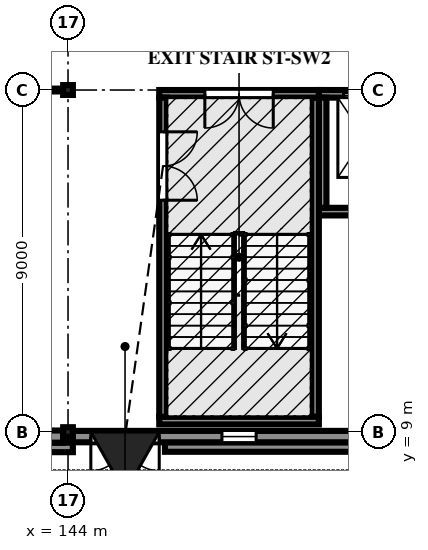
"""IFC4 building model, lengths in metres.
Left out: names, types, materials, properties, quantities, classifications, styles, units other than length and angle.
Written with IfcOpenShell. Run it as: python <this file> out.ifc"""

import sys

from ifc_helpers import new_model, si_unit, direction, frame, frame_2d, origin, origin_2d, place, context, subcontext, project, spatial, polyline, rectangle, i_section, outline, extrude, element, fill, save


model = new_model("IFC4")
c1 = context("Model", 3, precision=1e-05, world=origin(), true_north=direction((0.0, 1.0)))
c2 = subcontext(c1, "Body", "Model", "MODEL_VIEW")
j1 = project(units=[si_unit("LENGTHUNIT", "METRE"), si_unit("PLANEANGLEUNIT", "RADIAN")], contexts=[c1])
p1 = place(None, origin())
s1 = spatial("IfcSite", under=j1, at=p1, CompositionType="ELEMENT")
p2 = place(p1, origin())
s2 = spatial("IfcBuilding", under=s1, at=p2, CompositionType="ELEMENT")
p3 = place(p2, origin())
s3 = spatial("IfcBuildingStorey", under=s2, at=p3, CompositionType="ELEMENT", Elevation=0.0)
p4 = place(p3, frame((144.0, 9.0, -2.1), z_axis=(0.0, 0.0, 1.0), x_axis=(1.0, 0.0, 0.0)))
e1 = element("IfcColumn", 1, at=p4, inside=s3, PredefinedType="COLUMN", context=c2, shape_type="SweptSolid", body=[
    extrude(i_section(OverallWidth=0.255, OverallDepth=0.254, WebThickness=0.009, FlangeThickness=0.014, FilletRadius=0.013, at=origin_2d()), origin(), (0.0, 0.0, 1.0), 9.6),
])
p5 = place(p3, frame((144.0, 18.0, -2.1), z_axis=(0.0, 0.0, 1.0), x_axis=(1.0, 0.0, 0.0)))
e2 = element("IfcColumn", 2, at=p5, inside=s3, PredefinedType="COLUMN", context=c2, shape_type="SweptSolid", body=[
    extrude(i_section(OverallWidth=0.256, OverallDepth=0.26, WebThickness=0.01, FlangeThickness=0.017, FilletRadius=0.013, at=origin_2d()), origin(), (0.0, 0.0, 1.0), 9.6),
])
p6 = place(p3, frame((135.127, 8.88, 0.0), z_axis=(0.0, 0.0, 1.0), x_axis=(1.0, 0.0, 0.0)))
e3 = element("IfcWall", 3, at=p6, inside=s3, PredefinedType="SOLIDWALL", context=c2, shape_type="SweptSolid", body=[
    extrude(rectangle(XDim=8.746, YDim=0.32, at=frame_2d((4.373, 0.0))), origin(), (0.0, 0.0, 1.0), 6.767),
])
p7 = place(p6, frame((3.473, 0.0, 0.0)))
e4 = element("IfcOpeningElement", 4, at=p7, cuts=e3, PredefinedType="OPENING", context=c2, shape_type="SweptSolid", body=[
    extrude(rectangle(XDim=1.8, YDim=2.1, at=frame_2d((0.9, 1.05))), frame((0.0, 0.17, 0.0), z_axis=(0.0, -1.0, 0.0), x_axis=(1.0, 0.0, 0.0)), (0.0, 0.0, 1.0), 0.34),
])
p8 = place(p6, frame((3.773, 0.0, 2.55)))
e5 = element("IfcOpeningElement", 5, at=p8, cuts=e3, PredefinedType="OPENING", context=c2, shape_type="SweptSolid", body=[
    extrude(rectangle(XDim=1.2, YDim=0.6, at=frame_2d((0.6, 0.3))), frame((0.0, 0.17, 0.0), z_axis=(0.0, -1.0, 0.0), x_axis=(1.0, 0.0, 0.0)), (0.0, 0.0, 1.0), 0.34),
])
p9 = place(p6, frame((0.473, 0.0, 0.9)))
e6 = element("IfcOpeningElement", 6, at=p9, cuts=e3, PredefinedType="OPENING", context=c2, shape_type="SweptSolid", body=[
    extrude(rectangle(XDim=1.8, YDim=3.6, at=frame_2d((0.9, 1.8))), frame((0.0, 0.17, 0.0), z_axis=(0.0, -1.0, 0.0), x_axis=(1.0, 0.0, 0.0)), (0.0, 0.0, 1.0), 0.34),
])
p10 = place(p6, frame((6.473, 0.0, 0.9)))
e7 = element("IfcOpeningElement", 7, at=p10, cuts=e3, PredefinedType="OPENING", context=c2, shape_type="SweptSolid", body=[
    extrude(rectangle(XDim=1.8, YDim=3.6, at=frame_2d((0.9, 1.8))), frame((0.0, 0.17, 0.0), z_axis=(0.0, -1.0, 0.0), x_axis=(1.0, 0.0, 0.0)), (0.0, 0.0, 1.0), 0.34),
])
p11 = place(p3, frame((144.127, 8.88, 0.0), z_axis=(0.0, 0.0, 1.0), x_axis=(1.0, 0.0, 0.0)))
e8 = element("IfcWall", 8, at=p11, inside=s3, PredefinedType="SOLIDWALL", context=c2, shape_type="SweptSolid", body=[
    extrude(rectangle(XDim=8.746, YDim=0.3, at=frame_2d((4.373, 0.0))), origin(), (0.0, 0.0, 1.0), 6.767),
])
p12 = place(p11, frame((0.473, 0.0, 0.0)))
e9 = element("IfcOpeningElement", 9, at=p12, cuts=e8, PredefinedType="OPENING", context=c2, shape_type="SweptSolid", body=[
    extrude(rectangle(XDim=1.8, YDim=2.4, at=frame_2d((0.9, 1.2))), frame((0.0, 0.16, 0.0), z_axis=(0.0, -1.0, 0.0), x_axis=(1.0, 0.0, 0.0)), (0.0, 0.0, 1.0), 0.32),
])
p13 = place(p11, frame((0.773, 0.0, 2.55)))
e10 = element("IfcOpeningElement", 10, at=p13, cuts=e8, PredefinedType="OPENING", context=c2, shape_type="SweptSolid", body=[
    extrude(rectangle(XDim=1.2, YDim=0.6, at=frame_2d((0.6, 0.3))), frame((0.0, 0.16, 0.0), z_axis=(0.0, -1.0, 0.0), x_axis=(1.0, 0.0, 0.0)), (0.0, 0.0, 1.0), 0.32),
])
p14 = place(p11, frame((3.923, 0.0, 1.2)))
e11 = element("IfcOpeningElement", 11, at=p14, cuts=e8, PredefinedType="OPENING", context=c2, shape_type="SweptSolid", body=[
    extrude(rectangle(XDim=0.9, YDim=1.8, at=frame_2d((0.45, 0.9))), frame((0.0, 0.16, 0.0), z_axis=(0.0, -1.0, 0.0), x_axis=(1.0, 0.0, 0.0)), (0.0, 0.0, 1.0), 0.32),
])
p15 = place(p3, frame((140.55, 8.595, 0.0), z_axis=(0.0, 0.0, 1.0), x_axis=(1.0, 0.0, 0.0)))
e12 = element("IfcWall", 12, at=p15, inside=s3, PredefinedType="SOLIDWALL", context=c2, shape_type="SweptSolid", body=[
    extrude(outline(polyline([(0.0, 0.0), (3.577, 0.0), (3.577, 6.767), (0.0, 6.767), (0.0, 0.0)]), holes=[polyline([(0.9, 0.75), (0.9, 4.5), (0.942, 4.752), (1.11, 4.968), (1.257, 5.022), (1.383, 5.166), (1.656, 5.31), (1.95, 5.4), (2.244, 5.31), (2.517, 5.166), (2.643, 5.022), (2.79, 4.968), (2.958, 4.752), (3.0, 4.5), (3.0, 0.75), (0.9, 0.75)])]), frame((0.0, 0.125, 0.0), z_axis=(0.0, -1.0, 0.0), x_axis=(1.0, 0.0, 0.0)), (0.0, 0.0, 1.0), 0.25),
])
p16 = place(p3, frame((146.55, 8.605, 0.0), z_axis=(0.0, 0.0, 1.0), x_axis=(1.0, 0.0, 0.0)))
e13 = element("IfcWall", 13, at=p16, inside=s3, PredefinedType="SOLIDWALL", context=c2, shape_type="SweptSolid", body=[
    extrude(outline(polyline([(0.0, 0.0), (6.86, 0.0), (6.86, 6.767), (0.0, 6.767), (0.0, 0.0)]), holes=[polyline([(1.35, 1.05), (1.35, 3.0), (1.374, 3.252), (1.47, 3.468), (1.554, 3.522), (1.626, 3.666), (1.782, 3.81), (1.95, 3.9), (2.118, 3.81), (2.274, 3.666), (2.346, 3.522), (2.43, 3.468), (2.526, 3.252), (2.55, 3.0), (2.55, 1.05), (1.35, 1.05)])]), frame((0.0, 0.125, 0.0), z_axis=(0.0, -1.0, 0.0), x_axis=(1.0, 0.0, 0.0)), (0.0, 0.0, 1.0), 0.25),
])
p17 = place(p3, frame((146.4, 9.3, 0.0), z_axis=(0.0, 0.0, 1.0), x_axis=(1.0, 0.0, 0.0)))
e14 = element("IfcWall", 14, at=p17, inside=s3, PredefinedType="SOLIDWALL", context=c2, shape_type="SweptSolid", body=[
    extrude(rectangle(XDim=4.2, YDim=0.2, at=frame_2d((2.1, 0.0))), origin(), (0.0, 0.0, 1.0), 6.757),
])
p18 = place(p3, frame((146.4, 17.9, 0.0), z_axis=(0.0, 0.0, 1.0), x_axis=(1.0, 0.0, 0.0)))
e15 = element("IfcWall", 15, at=p18, inside=s3, PredefinedType="SOLIDWALL", context=c2, shape_type="SweptSolid", body=[
    extrude(rectangle(XDim=4.2, YDim=0.2, at=frame_2d((2.1, 0.0))), origin(), (0.0, 0.0, 1.0), 6.757),
])
p19 = place(p18, frame((1.2, 0.0, 0.0)))
e16 = element("IfcOpeningElement", 16, at=p19, cuts=e15, PredefinedType="OPENING", context=c2, shape_type="SweptSolid", body=[
    extrude(rectangle(XDim=1.8, YDim=2.1, at=frame_2d((0.9, 1.05))), frame((0.0, 0.11, 0.0), z_axis=(0.0, -1.0, 0.0), x_axis=(1.0, 0.0, 0.0)), (0.0, 0.0, 1.0), 0.22),
])
p20 = place(p3, frame((146.5, 9.4, 0.0), z_axis=(0.0, 0.0, 1.0), x_axis=(0.0, 1.0, 0.0)))
e17 = element("IfcWall", 17, at=p20, inside=s3, PredefinedType="SOLIDWALL", context=c2, shape_type="SweptSolid", body=[
    extrude(rectangle(XDim=8.4, YDim=0.2, at=frame_2d((4.2, 0.0))), origin(), (0.0, 0.0, 1.0), 6.757),
])
p21 = place(p20, frame((5.7, 0.0, 0.0)))
e18 = element("IfcOpeningElement", 18, at=p21, cuts=e17, PredefinedType="OPENING", context=c2, shape_type="SweptSolid", body=[
    extrude(rectangle(XDim=1.8, YDim=2.1, at=frame_2d((0.9, 1.05))), frame((0.0, 0.11, 0.0), z_axis=(0.0, -1.0, 0.0), x_axis=(1.0, 0.0, 0.0)), (0.0, 0.0, 1.0), 0.22),
])
p22 = place(p3, frame((150.5, 9.4, 0.0), z_axis=(0.0, 0.0, 1.0), x_axis=(0.0, 1.0, 0.0)))
e19 = element("IfcWall", 19, at=p22, inside=s3, PredefinedType="SOLIDWALL", context=c2, shape_type="SweptSolid", body=[
    extrude(rectangle(XDim=8.4, YDim=0.2, at=frame_2d((4.2, 0.0))), origin(), (0.0, 0.0, 1.0), 6.757),
])
p23 = place(p3, frame((150.602, 14.8, -1.6), z_axis=(0.0, 0.0, 1.0), x_axis=(1.0, 0.0, 0.0)))
e20 = element("IfcWall", 20, at=p23, inside=s3, PredefinedType="SOLIDWALL", context=c2, shape_type="SweptSolid", body=[
    extrude(rectangle(XDim=2.236, YDim=0.2, at=frame_2d((1.118, 0.0))), origin(), (0.0, 0.0, 1.0), 8.357),
])
p24 = place(p3, frame((150.602, 17.9, -1.6), z_axis=(0.0, 0.0, 1.0), x_axis=(1.0, 0.0, 0.0)))
e21 = element("IfcWall", 21, at=p24, inside=s3, PredefinedType="SOLIDWALL", context=c2, shape_type="SweptSolid", body=[
    extrude(rectangle(XDim=2.398, YDim=0.2, at=frame_2d((1.199, 0.0))), origin(), (0.0, 0.0, 1.0), 8.357),
])
p25 = place(p24, frame((0.648, 0.0, 1.6)))
e22 = element("IfcOpeningElement", 22, at=p25, cuts=e21, PredefinedType="OPENING", context=c2, shape_type="SweptSolid", body=[
    extrude(rectangle(XDim=1.1, YDim=2.1, at=frame_2d((0.55, 1.05))), frame((0.0, 0.11, 0.0), z_axis=(0.0, -1.0, 0.0), x_axis=(1.0, 0.0, 0.0)), (0.0, 0.0, 1.0), 0.22),
])
p26 = place(p3, frame((150.7, 14.9, -1.6), z_axis=(0.0, 0.0, 1.0), x_axis=(0.0, 1.0, 0.0)))
e23 = element("IfcWall", 23, at=p26, inside=s3, PredefinedType="SOLIDWALL", context=c2, shape_type="SweptSolid", body=[
    extrude(rectangle(XDim=2.9, YDim=0.2, at=frame_2d((1.45, 0.0))), origin(), (0.0, 0.0, 1.0), 8.357),
])
p27 = place(p3, frame((143.872, 18.0, 0.0), z_axis=(0.0, 0.0, 1.0), x_axis=(-1.0, 0.0, 0.0)))
e24 = element("IfcWall", 24, at=p27, inside=s3, PredefinedType="PARTITIONING", context=c2, shape_type="SweptSolid", body=[
    extrude(rectangle(XDim=8.744, YDim=0.075, at=frame_2d((4.372, 0.0))), origin(), (0.0, 0.0, 1.0), 6.692),
])
p28 = place(p27, frame((3.872, 0.0, 0.0)))
e25 = element("IfcOpeningElement", 25, at=p28, cuts=e24, PredefinedType="OPENING", context=c2, shape_type="SweptSolid", body=[
    extrude(rectangle(XDim=1.0, YDim=2.1, at=frame_2d((0.5, 1.05))), frame((0.0, 0.047, 0.0), z_axis=(0.0, -1.0, 0.0), x_axis=(1.0, 0.0, 0.0)), (0.0, 0.0, 1.0), 0.095),
])
p29 = place(p12, frame((1.8, 0.0, 0.0), z_axis=(0.0, 0.0, 1.0), x_axis=(-1.0, 0.0, 0.0)))
e26 = element("IfcDoor", 26, at=p29, inside=s3, OperationType="DOUBLE_DOOR_SINGLE_SWING", PredefinedType="DOOR", context=c2, shape_type="SweptSolid", body=[
    extrude(outline(polyline([(0.0, 0.0), (0.07, 0.0), (0.07, 2.33), (1.73, 2.33), (1.73, 0.0), (1.8, 0.0), (1.8, 2.4), (0.0, 2.4), (0.0, 0.0)])), frame((0.0, 0.025, 0.0), z_axis=(0.0, -1.0, 0.0), x_axis=(1.0, 0.0, 0.0)), (0.0, 0.0, 1.0), 0.05),
    extrude(outline(polyline([(0.074, 0.01), (0.897, 0.01), (0.897, 2.326), (0.074, 2.326), (0.074, 0.01)]), holes=[polyline([(0.194, 0.16), (0.777, 0.16), (0.777, 1.01), (0.194, 1.01), (0.194, 0.16)]), polyline([(0.335, 1.16), (0.635, 1.16), (0.635, 1.76), (0.335, 1.76), (0.335, 1.16)])]), frame((0.0, 0.017, 0.0), z_axis=(0.0, -1.0, 0.0), x_axis=(1.0, 0.0, 0.0)), (0.0, 0.0, 1.0), 0.035),
    extrude(rectangle(XDim=0.583, YDim=0.85, at=frame_2d((0.485, 0.585))), frame((0.0, 0.009, 0.0), z_axis=(0.0, -1.0, 0.0), x_axis=(1.0, 0.0, 0.0)), (0.0, 0.0, 1.0), 0.017),
    extrude(rectangle(XDim=0.3, YDim=0.6, at=frame_2d((0.485, 1.46))), frame((0.0, 0.006, 0.0), z_axis=(0.0, -1.0, 0.0), x_axis=(1.0, 0.0, 0.0)), (0.0, 0.0, 1.0), 0.012),
    extrude(outline(polyline([(0.903, 0.01), (1.726, 0.01), (1.726, 2.326), (0.903, 2.326), (0.903, 0.01)]), holes=[polyline([(1.023, 0.16), (1.606, 0.16), (1.606, 1.01), (1.023, 1.01), (1.023, 0.16)]), polyline([(1.165, 1.16), (1.465, 1.16), (1.465, 1.76), (1.165, 1.76), (1.165, 1.16)])]), frame((0.0, 0.017, 0.0), z_axis=(0.0, -1.0, 0.0), x_axis=(1.0, 0.0, 0.0)), (0.0, 0.0, 1.0), 0.035),
    extrude(rectangle(XDim=0.583, YDim=0.85, at=frame_2d((1.314, 0.585))), frame((0.0, 0.009, 0.0), z_axis=(0.0, -1.0, 0.0), x_axis=(1.0, 0.0, 0.0)), (0.0, 0.0, 1.0), 0.017),
    extrude(rectangle(XDim=0.3, YDim=0.6, at=frame_2d((1.314, 1.46))), frame((0.0, 0.006, 0.0), z_axis=(0.0, -1.0, 0.0), x_axis=(1.0, 0.0, 0.0)), (0.0, 0.0, 1.0), 0.012),
])
fill(e9, e26)
p30 = place(p13, origin())
e27 = element("IfcWindow", 27, at=p30, inside=s3, PartitioningType="SINGLE_PANEL", PredefinedType="WINDOW", context=c2, shape_type="SweptSolid", body=[
    extrude(outline(polyline([(0.0, 0.0), (1.2, 0.0), (1.2, 0.6), (0.0, 0.6), (0.0, 0.0)]), holes=[polyline([(0.07, 0.07), (1.13, 0.07), (1.13, 0.53), (0.07, 0.53), (0.07, 0.07)])]), frame((0.0, 0.03, 0.0), z_axis=(0.0, -1.0, 0.0), x_axis=(1.0, 0.0, 0.0)), (0.0, 0.0, 1.0), 0.06),
    extrude(outline(polyline([(0.07, 0.07), (1.13, 0.07), (1.13, 0.53), (0.07, 0.53), (0.07, 0.07)]), holes=[polyline([(0.1, 0.1), (1.1, 0.1), (1.1, 0.5), (0.1, 0.5), (0.1, 0.1)])]), frame((0.0, 0.022, 0.0), z_axis=(0.0, -1.0, 0.0), x_axis=(1.0, 0.0, 0.0)), (0.0, 0.0, 1.0), 0.045),
    extrude(rectangle(XDim=1.0, YDim=0.4, at=frame_2d((0.6, 0.3))), frame((0.0, 0.006, 0.0), z_axis=(0.0, -1.0, 0.0), x_axis=(1.0, 0.0, 0.0)), (0.0, 0.0, 1.0), 0.012),
])
fill(e10, e27)
p31 = place(p14, origin())
e28 = element("IfcWindow", 28, at=p31, inside=s3, PartitioningType="SINGLE_PANEL", PredefinedType="WINDOW", context=c2, shape_type="SweptSolid", body=[
    extrude(outline(polyline([(0.0, 0.0), (0.9, 0.0), (0.9, 1.235), (0.896, 1.3), (0.885, 1.364), (0.867, 1.426), (0.843, 1.486), (0.811, 1.543), (0.774, 1.596), (0.73, 1.645), (0.682, 1.688), (0.629, 1.726), (0.572, 1.757), (0.512, 1.782), (0.45, 1.8), (0.387, 1.782), (0.328, 1.757), (0.271, 1.726), (0.218, 1.688), (0.169, 1.645), (0.126, 1.596), (0.089, 1.543), (0.057, 1.486), (0.032, 1.426), (0.014, 1.364), (0.004, 1.3), (0.0, 1.235), (0.0, 0.0)]), holes=[polyline([(0.07, 0.07), (0.83, 0.07), (0.83, 1.235), (0.827, 1.291), (0.818, 1.346), (0.803, 1.4), (0.782, 1.451), (0.755, 1.501), (0.724, 1.547), (0.688, 1.589), (0.647, 1.627), (0.602, 1.661), (0.554, 1.689), (0.503, 1.713), (0.45, 1.73), (0.397, 1.713), (0.346, 1.689), (0.298, 1.661), (0.253, 1.627), (0.212, 1.589), (0.176, 1.547), (0.145, 1.501), (0.118, 1.451), (0.097, 1.4), (0.082, 1.346), (0.073, 1.291), (0.07, 1.235), (0.07, 0.07)])]), frame((0.0, 0.03, 0.0), z_axis=(0.0, -1.0, 0.0), x_axis=(1.0, 0.0, 0.0)), (0.0, 0.0, 1.0), 0.06),
    extrude(outline(polyline([(0.0, 1.235), (0.004, 1.3), (0.014, 1.364), (0.032, 1.426), (0.057, 1.486), (0.089, 1.543), (0.126, 1.596), (0.169, 1.645), (0.218, 1.688), (0.271, 1.726), (0.328, 1.757), (0.387, 1.782), (0.45, 1.8), (0.0, 1.8), (0.0, 1.235)])), frame((0.0, 0.028, 0.0), z_axis=(0.0, -1.0, 0.0), x_axis=(1.0, 0.0, 0.0)), (0.0, 0.0, 1.0), 0.056),
    extrude(outline(polyline([(0.45, 1.8), (0.512, 1.782), (0.572, 1.757), (0.629, 1.726), (0.682, 1.688), (0.73, 1.645), (0.774, 1.596), (0.811, 1.543), (0.843, 1.486), (0.867, 1.426), (0.885, 1.364), (0.896, 1.3), (0.9, 1.235), (0.9, 1.8), (0.45, 1.8)])), frame((0.0, 0.027, 0.0), z_axis=(0.0, -1.0, 0.0), x_axis=(1.0, 0.0, 0.0)), (0.0, 0.0, 1.0), 0.054),
    extrude(outline(polyline([(0.828, 1.275), (0.072, 1.275), (0.07, 1.235), (0.07, 1.195), (0.83, 1.195), (0.83, 1.235), (0.828, 1.275)])), frame((0.0, 0.021, 0.0), z_axis=(0.0, -1.0, 0.0), x_axis=(1.0, 0.0, 0.0)), (0.0, 0.0, 1.0), 0.042),
    extrude(outline(polyline([(0.07, 0.07), (0.83, 0.07), (0.83, 1.195), (0.07, 1.195), (0.07, 0.07)]), holes=[polyline([(0.1, 0.1), (0.8, 0.1), (0.8, 1.165), (0.1, 1.165), (0.1, 0.1)])]), frame((0.0, 0.022, 0.0), z_axis=(0.0, -1.0, 0.0), x_axis=(1.0, 0.0, 0.0)), (0.0, 0.0, 1.0), 0.045),
    extrude(rectangle(XDim=0.7, YDim=1.065, at=frame_2d((0.45, 0.632))), frame((0.0, 0.006, 0.0), z_axis=(0.0, -1.0, 0.0), x_axis=(1.0, 0.0, 0.0)), (0.0, 0.0, 1.0), 0.012),
    extrude(outline(polyline([(0.072, 1.275), (0.828, 1.275), (0.827, 1.291), (0.818, 1.346), (0.803, 1.4), (0.782, 1.451), (0.755, 1.501), (0.724, 1.547), (0.688, 1.589), (0.647, 1.627), (0.602, 1.661), (0.554, 1.689), (0.503, 1.713), (0.45, 1.73), (0.397, 1.713), (0.346, 1.689), (0.298, 1.661), (0.253, 1.627), (0.212, 1.589), (0.176, 1.547), (0.145, 1.501), (0.118, 1.451), (0.097, 1.4), (0.082, 1.346), (0.073, 1.291), (0.072, 1.275)]), holes=[polyline([(0.112, 1.31), (0.116, 1.338), (0.13, 1.388), (0.15, 1.437), (0.175, 1.483), (0.204, 1.526), (0.238, 1.565), (0.276, 1.601), (0.317, 1.632), (0.362, 1.658), (0.409, 1.68), (0.45, 1.693), (0.49, 1.68), (0.538, 1.658), (0.583, 1.632), (0.624, 1.601), (0.662, 1.565), (0.696, 1.526), (0.725, 1.483), (0.75, 1.437), (0.77, 1.388), (0.783, 1.338), (0.788, 1.31), (0.112, 1.31)])]), frame((0.0, 0.022, 0.0), z_axis=(0.0, -1.0, 0.0), x_axis=(1.0, 0.0, 0.0)), (0.0, 0.0, 1.0), 0.045),
    extrude(outline(polyline([(0.788, 1.31), (0.783, 1.338), (0.77, 1.388), (0.75, 1.437), (0.725, 1.483), (0.696, 1.526), (0.662, 1.565), (0.624, 1.601), (0.583, 1.632), (0.538, 1.658), (0.49, 1.68), (0.45, 1.693), (0.409, 1.68), (0.362, 1.658), (0.317, 1.632), (0.276, 1.601), (0.238, 1.565), (0.204, 1.526), (0.175, 1.483), (0.15, 1.437), (0.13, 1.388), (0.116, 1.338), (0.112, 1.31), (0.788, 1.31)])), frame((0.0, 0.006, 0.0), z_axis=(0.0, -1.0, 0.0), x_axis=(1.0, 0.0, 0.0)), (0.0, 0.0, 1.0), 0.012),
])
fill(e11, e28)
p32 = place(p25, origin())
e29 = element("IfcDoor", 29, at=p32, inside=s3, OperationType="SLIDING_TO_LEFT", PredefinedType="DOOR", context=c2, shape_type="SweptSolid", body=[
    extrude(outline(polyline([(0.0, 0.0), (0.07, 0.0), (0.07, 2.03), (1.03, 2.03), (1.03, 0.0), (1.1, 0.0), (1.1, 2.1), (0.0, 2.1), (0.0, 0.0)])), frame((0.0, 0.025, 0.0), z_axis=(0.0, -1.0, 0.0), x_axis=(1.0, 0.0, 0.0)), (0.0, 0.0, 1.0), 0.05),
    extrude(rectangle(XDim=0.524, YDim=2.016, at=frame_2d((0.336, 1.018))), frame((0.0, 0.018, 0.0), z_axis=(0.0, -1.0, 0.0), x_axis=(1.0, 0.0, 0.0)), (0.0, 0.0, 1.0), 0.016),
    extrude(rectangle(XDim=0.52, YDim=2.016, at=frame_2d((0.766, 1.018))), frame((0.0, -0.002, 0.0), z_axis=(0.0, -1.0, 0.0), x_axis=(1.0, 0.0, 0.0)), (0.0, 0.0, 1.0), 0.016),
])
fill(e22, e29)
p33 = place(p21, frame((1.8, 0.0, 0.0), z_axis=(0.0, 0.0, 1.0), x_axis=(-1.0, 0.0, 0.0)))
e30 = element("IfcDoor", 30, at=p33, inside=s3, OperationType="DOUBLE_DOOR_SINGLE_SWING", PredefinedType="DOOR", context=c2, shape_type="SweptSolid", body=[
    extrude(outline(polyline([(0.0, 0.0), (0.07, 0.0), (0.07, 2.03), (1.73, 2.03), (1.73, 0.0), (1.8, 0.0), (1.8, 2.1), (0.0, 2.1), (0.0, 0.0)])), frame((0.0, 0.025, 0.0), z_axis=(0.0, -1.0, 0.0), x_axis=(1.0, 0.0, 0.0)), (0.0, 0.0, 1.0), 0.05),
    extrude(outline(polyline([(0.074, 0.01), (0.897, 0.01), (0.897, 2.026), (0.074, 2.026), (0.074, 0.01)]), holes=[polyline([(0.194, 0.16), (0.777, 0.16), (0.777, 1.01), (0.194, 1.01), (0.194, 0.16)]), polyline([(0.335, 1.16), (0.635, 1.16), (0.635, 1.76), (0.335, 1.76), (0.335, 1.16)])]), frame((0.0, 0.017, 0.0), z_axis=(0.0, -1.0, 0.0), x_axis=(1.0, 0.0, 0.0)), (0.0, 0.0, 1.0), 0.035),
    extrude(rectangle(XDim=0.583, YDim=0.85, at=frame_2d((0.485, 0.585))), frame((0.0, 0.009, 0.0), z_axis=(0.0, -1.0, 0.0), x_axis=(1.0, 0.0, 0.0)), (0.0, 0.0, 1.0), 0.017),
    extrude(rectangle(XDim=0.3, YDim=0.6, at=frame_2d((0.485, 1.46))), frame((0.0, 0.006, 0.0), z_axis=(0.0, -1.0, 0.0), x_axis=(1.0, 0.0, 0.0)), (0.0, 0.0, 1.0), 0.012),
    extrude(outline(polyline([(0.903, 0.01), (1.726, 0.01), (1.726, 2.026), (0.903, 2.026), (0.903, 0.01)]), holes=[polyline([(1.023, 0.16), (1.606, 0.16), (1.606, 1.01), (1.023, 1.01), (1.023, 0.16)]), polyline([(1.165, 1.16), (1.465, 1.16), (1.465, 1.76), (1.165, 1.76), (1.165, 1.16)])]), frame((0.0, 0.017, 0.0), z_axis=(0.0, -1.0, 0.0), x_axis=(1.0, 0.0, 0.0)), (0.0, 0.0, 1.0), 0.035),
    extrude(rectangle(XDim=0.583, YDim=0.85, at=frame_2d((1.314, 0.585))), frame((0.0, 0.009, 0.0), z_axis=(0.0, -1.0, 0.0), x_axis=(1.0, 0.0, 0.0)), (0.0, 0.0, 1.0), 0.017),
    extrude(rectangle(XDim=0.3, YDim=0.6, at=frame_2d((1.314, 1.46))), frame((0.0, 0.006, 0.0), z_axis=(0.0, -1.0, 0.0), x_axis=(1.0, 0.0, 0.0)), (0.0, 0.0, 1.0), 0.012),
])
fill(e18, e30)
p34 = place(p19, frame((1.8, 0.0, 0.0), z_axis=(0.0, 0.0, 1.0), x_axis=(-1.0, 0.0, 0.0)))
e31 = element("IfcDoor", 31, at=p34, inside=s3, OperationType="DOUBLE_DOOR_SINGLE_SWING", PredefinedType="DOOR", context=c2, shape_type="SweptSolid", body=[
    extrude(outline(polyline([(0.0, 0.0), (0.07, 0.0), (0.07, 2.03), (1.73, 2.03), (1.73, 0.0), (1.8, 0.0), (1.8, 2.1), (0.0, 2.1), (0.0, 0.0)])), frame((0.0, 0.025, 0.0), z_axis=(0.0, -1.0, 0.0), x_axis=(1.0, 0.0, 0.0)), (0.0, 0.0, 1.0), 0.05),
    extrude(outline(polyline([(0.074, 0.01), (0.897, 0.01), (0.897, 2.026), (0.074, 2.026), (0.074, 0.01)]), holes=[polyline([(0.194, 0.16), (0.777, 0.16), (0.777, 1.01), (0.194, 1.01), (0.194, 0.16)]), polyline([(0.335, 1.16), (0.635, 1.16), (0.635, 1.76), (0.335, 1.76), (0.335, 1.16)])]), frame((0.0, 0.017, 0.0), z_axis=(0.0, -1.0, 0.0), x_axis=(1.0, 0.0, 0.0)), (0.0, 0.0, 1.0), 0.035),
    extrude(rectangle(XDim=0.583, YDim=0.85, at=frame_2d((0.485, 0.585))), frame((0.0, 0.009, 0.0), z_axis=(0.0, -1.0, 0.0), x_axis=(1.0, 0.0, 0.0)), (0.0, 0.0, 1.0), 0.017),
    extrude(rectangle(XDim=0.3, YDim=0.6, at=frame_2d((0.485, 1.46))), frame((0.0, 0.006, 0.0), z_axis=(0.0, -1.0, 0.0), x_axis=(1.0, 0.0, 0.0)), (0.0, 0.0, 1.0), 0.012),
    extrude(outline(polyline([(0.903, 0.01), (1.726, 0.01), (1.726, 2.026), (0.903, 2.026), (0.903, 0.01)]), holes=[polyline([(1.023, 0.16), (1.606, 0.16), (1.606, 1.01), (1.023, 1.01), (1.023, 0.16)]), polyline([(1.165, 1.16), (1.465, 1.16), (1.465, 1.76), (1.165, 1.76), (1.165, 1.16)])]), frame((0.0, 0.017, 0.0), z_axis=(0.0, -1.0, 0.0), x_axis=(1.0, 0.0, 0.0)), (0.0, 0.0, 1.0), 0.035),
    extrude(rectangle(XDim=0.583, YDim=0.85, at=frame_2d((1.314, 0.585))), frame((0.0, 0.009, 0.0), z_axis=(0.0, -1.0, 0.0), x_axis=(1.0, 0.0, 0.0)), (0.0, 0.0, 1.0), 0.017),
    extrude(rectangle(XDim=0.3, YDim=0.6, at=frame_2d((1.314, 1.46))), frame((0.0, 0.006, 0.0), z_axis=(0.0, -1.0, 0.0), x_axis=(1.0, 0.0, 0.0)), (0.0, 0.0, 1.0), 0.012),
])
fill(e16, e31)
save(model, sys.argv[1])
